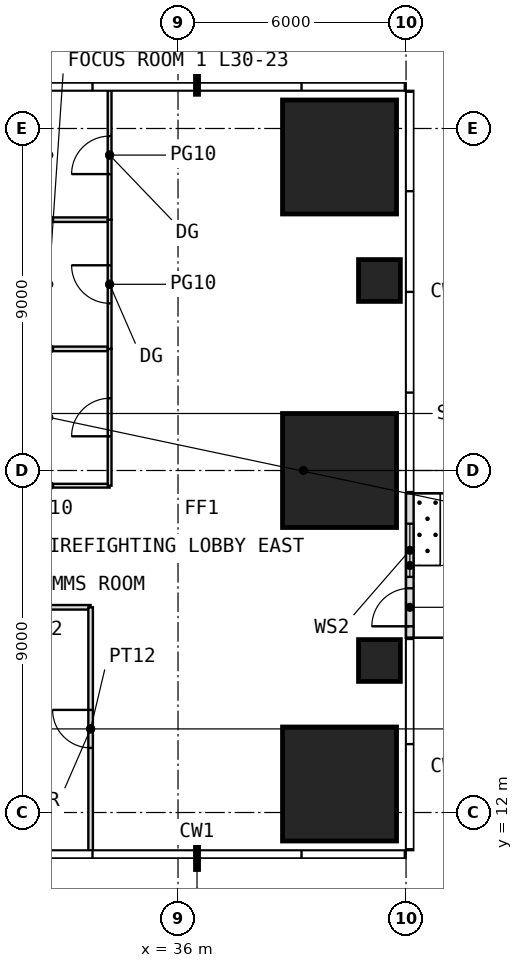
"""IFC4 building model, lengths in metres.
Left out: names, types, materials, properties, quantities, classifications, styles, units other than length and angle.
Written with IfcOpenShell. Run it as: python <this file> out.ifc"""

import sys

from ifc_helpers import new_model, si_unit, direction, frame, frame_2d, origin, origin_2d, place, context, subcontext, project, spatial, rectangle, extrude, element, fill, save


model = new_model("IFC4")
c1 = context("Model", 3, precision=1e-05, world=origin(), true_north=direction((0.0, 1.0)))
c2 = subcontext(c1, "Body", "Model", "MODEL_VIEW")
j1 = project(units=[si_unit("LENGTHUNIT", "METRE"), si_unit("PLANEANGLEUNIT", "RADIAN")], contexts=[c1])
p1 = place(None, origin())
s1 = spatial("IfcSite", under=j1, at=p1, CompositionType="ELEMENT")
p2 = place(p1, origin())
s2 = spatial("IfcBuilding", under=s1, at=p2, CompositionType="ELEMENT")
p3 = place(p2, frame((0.0, 0.0, 128.5)))
s3 = spatial("IfcBuildingStorey", under=s2, at=p3, CompositionType="ELEMENT", Elevation=128.5)
p4 = place(p3, frame((40.25, 12.75, 0.0), z_axis=(0.0, 0.0, 1.0), x_axis=(1.0, 0.0, 0.0)))
e1 = element("IfcColumn", 1, at=p4, inside=s3, PredefinedType="COLUMN", context=c2, shape_type="SweptSolid", body=[
    extrude(rectangle(XDim=3.0, YDim=3.0, at=origin_2d()), origin(), (0.0, 0.0, 1.0), 4.0),
])
p5 = place(p3, frame((41.3, 16.0, 0.0), z_axis=(0.0, 0.0, 1.0), x_axis=(1.0, 0.0, 0.0)))
e2 = element("IfcColumn", 2, at=p5, inside=s3, PredefinedType="COLUMN", context=c2, shape_type="SweptSolid", body=[
    extrude(rectangle(XDim=1.1, YDim=1.1, at=origin_2d()), origin(), (0.0, 0.0, 1.0), 4.0),
])
p6 = place(p3, frame((40.25, 21.0, 0.0), z_axis=(0.0, 0.0, 1.0), x_axis=(1.0, 0.0, 0.0)))
e3 = element("IfcColumn", 3, at=p6, inside=s3, PredefinedType="COLUMN", context=c2, shape_type="SweptSolid", body=[
    extrude(rectangle(XDim=3.0, YDim=3.0, at=origin_2d()), origin(), (0.0, 0.0, 1.0), 4.0),
])
p7 = place(p3, frame((41.3, 26.0, 0.0), z_axis=(0.0, 0.0, 1.0), x_axis=(1.0, 0.0, 0.0)))
e4 = element("IfcColumn", 4, at=p7, inside=s3, PredefinedType="COLUMN", context=c2, shape_type="SweptSolid", body=[
    extrude(rectangle(XDim=1.1, YDim=1.1, at=origin_2d()), origin(), (0.0, 0.0, 1.0), 4.0),
])
p8 = place(p3, frame((40.25, 29.25, 0.0), z_axis=(0.0, 0.0, 1.0), x_axis=(1.0, 0.0, 0.0)))
e5 = element("IfcColumn", 5, at=p8, inside=s3, PredefinedType="COLUMN", context=c2, shape_type="SweptSolid", body=[
    extrude(rectangle(XDim=3.0, YDim=3.0, at=origin_2d()), origin(), (0.0, 0.0, 1.0), 4.0),
])
p9 = place(p3, frame((42.1, 16.6, 0.0), z_axis=(0.0, 0.0, 1.0), x_axis=(0.0, 1.0, 0.0)))
e6 = element("IfcWall", 6, at=p9, inside=s3, PredefinedType="USERDEFINED", context=c2, shape_type="SweptSolid", body=[
    extrude(rectangle(XDim=3.8, YDim=0.2, at=frame_2d((1.9, 0.0))), origin(), (0.0, 0.0, 1.0), 3.75),
])
p10 = place(p9, frame((0.3, 0.0, 0.0)))
e7 = element("IfcOpeningElement", 7, at=p10, cuts=e6, PredefinedType="OPENING", context=c2, shape_type="SweptSolid", body=[
    extrude(rectangle(XDim=1.0, YDim=2.4, at=frame_2d((0.5, 1.2))), frame((0.0, 0.11, 0.0), z_axis=(0.0, -1.0, 0.0), x_axis=(1.0, 0.0, 0.0)), (0.0, 0.0, 1.0), 0.22),
])
p11 = place(p9, frame((1.6, 0.0, 0.3)))
e8 = element("IfcOpeningElement", 8, at=p11, cuts=e6, PredefinedType="OPENING", context=c2, shape_type="SweptSolid", body=[
    extrude(rectangle(XDim=1.4, YDim=2.7, at=frame_2d((0.7, 1.35))), frame((0.0, 0.11, 0.0), z_axis=(0.0, -1.0, 0.0), x_axis=(1.0, 0.0, 0.0)), (0.0, 0.0, 1.0), 0.22),
])
p12 = place(p3, frame((31.05, 17.4, 0.0), z_axis=(0.0, 0.0, 1.0), x_axis=(1.0, 0.0, 0.0)))
e9 = element("IfcWall", 9, at=p12, inside=s3, PredefinedType="PARTITIONING", context=c2, shape_type="SweptSolid", body=[
    extrude(rectangle(XDim=2.65, YDim=0.12, at=frame_2d((1.325, 0.0))), origin(), (0.0, 0.0, 1.0), 3.75),
])
p13 = place(p3, frame((31.05, 20.6, 0.0), z_axis=(0.0, 0.0, 1.0), x_axis=(1.0, 0.0, 0.0)))
e10 = element("IfcWall", 10, at=p13, inside=s3, PredefinedType="PARTITIONING", context=c2, shape_type="SweptSolid", body=[
    extrude(rectangle(XDim=3.15, YDim=0.1, at=frame_2d((1.575, 0.0))), origin(), (0.0, 0.0, 1.0), 3.75),
])
for number, where, z_axis, x_axis in (
    (11, (31.05, 24.2, 0.0), (0.0, 0.0, 1.0), (1.0, 0.0, 0.0)),
    (12, (31.05, 27.6, 0.0), (0.0, 0.0, 1.0), (1.0, 0.0, 0.0)),
):
    element("IfcWall", number, at=place(p3, frame(where, z_axis=z_axis, x_axis=x_axis)), inside=s3, PredefinedType="PARTITIONING", context=c2, shape_type="SweptSolid", body=[
        extrude(rectangle(XDim=3.15, YDim=0.12, at=frame_2d((1.575, 0.0))), origin(), (0.0, 0.0, 1.0), 3.75),
    ])
p14 = place(p3, frame((33.7, 11.0, 0.0), z_axis=(0.0, 0.0, 1.0), x_axis=(0.0, 1.0, 0.0)))
e13 = element("IfcWall", 13, at=p14, inside=s3, PredefinedType="PARTITIONING", context=c2, shape_type="SweptSolid", body=[
    extrude(rectangle(XDim=6.4, YDim=0.12, at=frame_2d((3.2, 0.0))), origin(), (0.0, 0.0, 1.0), 3.75),
])
p15 = place(p14, frame((2.7, 0.0, 0.0)))
e14 = element("IfcOpeningElement", 14, at=p15, cuts=e13, PredefinedType="OPENING", context=c2, shape_type="SweptSolid", body=[
    extrude(rectangle(XDim=1.0, YDim=2.2, at=frame_2d((0.5, 1.1))), frame((0.0, 0.07, 0.0), z_axis=(0.0, -1.0, 0.0), x_axis=(1.0, 0.0, 0.0)), (0.0, 0.0, 1.0), 0.14),
])
p16 = place(p3, frame((34.2, 20.6, 0.0), z_axis=(0.0, 0.0, 1.0), x_axis=(0.0, 1.0, 0.0)))
e15 = element("IfcWall", 15, at=p16, inside=s3, PredefinedType="PARTITIONING", context=c2, shape_type="SweptSolid", body=[
    extrude(rectangle(XDim=3.6, YDim=0.1, at=frame_2d((1.8, 0.0))), origin(), (0.0, 0.0, 1.0), 3.75),
])
p17 = place(p16, frame((1.3, 0.0, 0.0)))
e16 = element("IfcOpeningElement", 16, at=p17, cuts=e15, PredefinedType="OPENING", context=c2, shape_type="SweptSolid", body=[
    extrude(rectangle(XDim=1.0, YDim=2.4, at=frame_2d((0.5, 1.2))), frame((0.0, 0.06, 0.0), z_axis=(0.0, -1.0, 0.0), x_axis=(1.0, 0.0, 0.0)), (0.0, 0.0, 1.0), 0.12),
])
p18 = place(p3, frame((34.2, 24.2, 0.0), z_axis=(0.0, 0.0, 1.0), x_axis=(0.0, 1.0, 0.0)))
e17 = element("IfcWall", 17, at=p18, inside=s3, PredefinedType="PARTITIONING", context=c2, shape_type="SweptSolid", body=[
    extrude(rectangle(XDim=3.4, YDim=0.1, at=frame_2d((1.7, 0.0))), origin(), (0.0, 0.0, 1.0), 3.75),
])
p19 = place(p18, frame((1.2, 0.0, 0.0)))
e18 = element("IfcOpeningElement", 18, at=p19, cuts=e17, PredefinedType="OPENING", context=c2, shape_type="SweptSolid", body=[
    extrude(rectangle(XDim=1.0, YDim=2.4, at=frame_2d((0.5, 1.2))), frame((0.0, 0.06, 0.0), z_axis=(0.0, -1.0, 0.0), x_axis=(1.0, 0.0, 0.0)), (0.0, 0.0, 1.0), 0.12),
])
p20 = place(p3, frame((34.2, 27.6, 0.0), z_axis=(0.0, 0.0, 1.0), x_axis=(0.0, 1.0, 0.0)))
e19 = element("IfcWall", 19, at=p20, inside=s3, PredefinedType="PARTITIONING", context=c2, shape_type="SweptSolid", body=[
    extrude(rectangle(XDim=3.4, YDim=0.1, at=frame_2d((1.7, 0.0))), origin(), (0.0, 0.0, 1.0), 3.75),
])
p21 = place(p20, frame((1.2, 0.0, 0.0)))
e20 = element("IfcOpeningElement", 20, at=p21, cuts=e19, PredefinedType="OPENING", context=c2, shape_type="SweptSolid", body=[
    extrude(rectangle(XDim=1.0, YDim=2.4, at=frame_2d((0.5, 1.2))), frame((0.0, 0.06, 0.0), z_axis=(0.0, -1.0, 0.0), x_axis=(1.0, 0.0, 0.0)), (0.0, 0.0, 1.0), 0.12),
])
p22 = place(p10, origin())
e21 = element("IfcDoor", 21, at=p22, inside=s3, OperationType="SINGLE_SWING_LEFT", PredefinedType="DOOR", context=c2, shape_type="SweptSolid", body=[
    extrude(rectangle(XDim=1.0, YDim=2.4, at=frame_2d((0.5, 1.2))), frame((0.0, 0.025, 0.0), z_axis=(0.0, -1.0, 0.0), x_axis=(1.0, 0.0, 0.0)), (0.0, 0.0, 1.0), 0.05),
])
fill(e7, e21)
p23 = place(p11, origin())
e22 = element("IfcWindow", 22, at=p23, inside=s3, PartitioningType="SINGLE_PANEL", PredefinedType="WINDOW", context=c2, shape_type="SweptSolid", body=[
    extrude(rectangle(XDim=1.4, YDim=2.7, at=frame_2d((0.7, 1.35))), frame((0.0, 0.03, 0.0), z_axis=(0.0, -1.0, 0.0), x_axis=(1.0, 0.0, 0.0)), (0.0, 0.0, 1.0), 0.06),
])
fill(e8, e22)
p24 = place(p15, origin())
e23 = element("IfcDoor", 23, at=p24, inside=s3, OperationType="SINGLE_SWING_RIGHT", PredefinedType="DOOR", context=c2, shape_type="SweptSolid", body=[
    extrude(rectangle(XDim=1.0, YDim=2.2, at=frame_2d((0.5, 1.1))), frame((0.0, 0.025, 0.0), z_axis=(0.0, -1.0, 0.0), x_axis=(1.0, 0.0, 0.0)), (0.0, 0.0, 1.0), 0.05),
])
fill(e14, e23)
p25 = place(p17, origin())
e24 = element("IfcDoor", 24, at=p25, inside=s3, OperationType="SINGLE_SWING_LEFT", PredefinedType="DOOR", context=c2, shape_type="SweptSolid", body=[
    extrude(rectangle(XDim=1.0, YDim=2.4, at=frame_2d((0.5, 1.2))), frame((0.0, 0.025, 0.0), z_axis=(0.0, -1.0, 0.0), x_axis=(1.0, 0.0, 0.0)), (0.0, 0.0, 1.0), 0.05),
])
fill(e16, e24)
p26 = place(p19, origin())
e25 = element("IfcDoor", 25, at=p26, inside=s3, OperationType="SINGLE_SWING_RIGHT", PredefinedType="DOOR", context=c2, shape_type="SweptSolid", body=[
    extrude(rectangle(XDim=1.0, YDim=2.4, at=frame_2d((0.5, 1.2))), frame((0.0, 0.025, 0.0), z_axis=(0.0, -1.0, 0.0), x_axis=(1.0, 0.0, 0.0)), (0.0, 0.0, 1.0), 0.05),
])
fill(e18, e25)
p27 = place(p21, origin())
e26 = element("IfcDoor", 26, at=p27, inside=s3, OperationType="SINGLE_SWING_LEFT", PredefinedType="DOOR", context=c2, shape_type="SweptSolid", body=[
    extrude(rectangle(XDim=1.0, YDim=2.4, at=frame_2d((0.5, 1.2))), frame((0.0, 0.025, 0.0), z_axis=(0.0, -1.0, 0.0), x_axis=(1.0, 0.0, 0.0)), (0.0, 0.0, 1.0), 0.05),
])
fill(e20, e26)
save(model, sys.argv[1])
